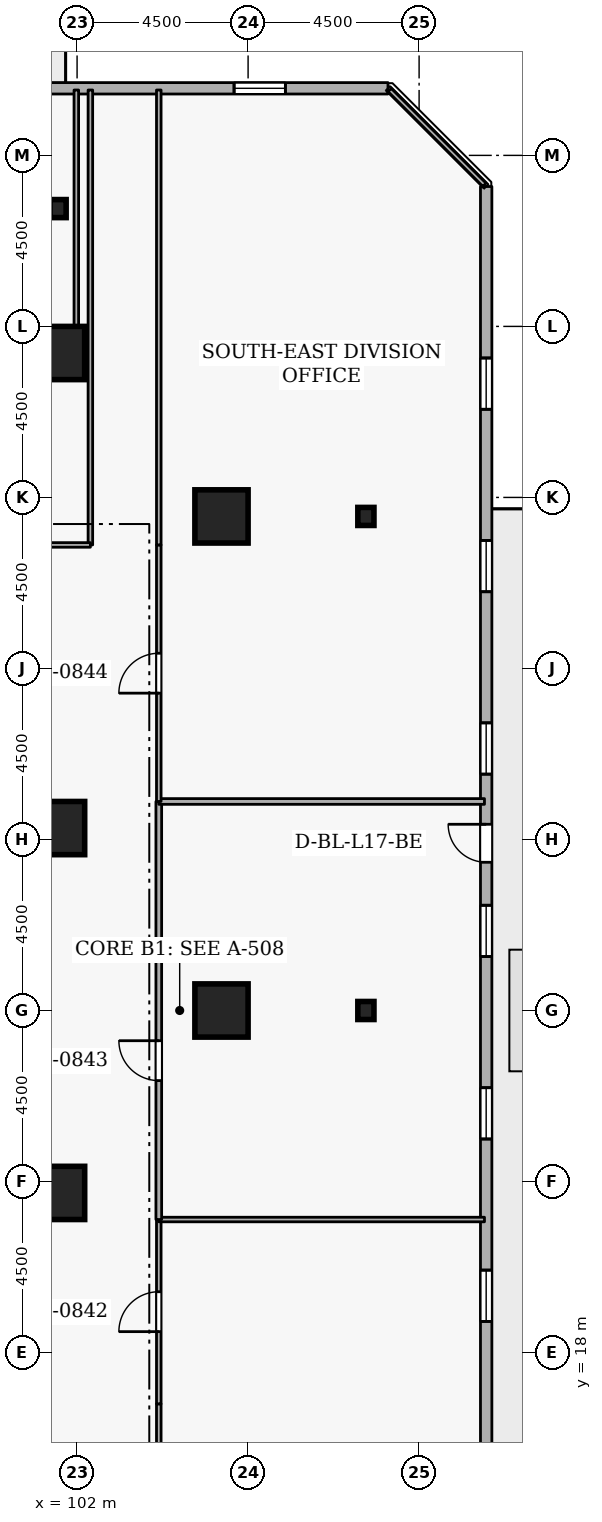
"""IFC4 building model, lengths in metres.
Left out: names, types, materials, properties, quantities, classifications, styles, units other than length and angle.
Written with IfcOpenShell. Run it as: python <this file> out.ifc"""

import sys

from ifc_helpers import new_model, si_unit, direction, frame, frame_2d, origin, origin_2d, place, context, subcontext, project, spatial, rectangle, i_section, extrude, element, fill, save


model = new_model("IFC4")
c1 = context("Model", 3, precision=1e-05, world=origin(), true_north=direction((0.0, 1.0)))
c2 = subcontext(c1, "Body", "Model", "MODEL_VIEW")
j1 = project(units=[si_unit("LENGTHUNIT", "METRE"), si_unit("PLANEANGLEUNIT", "RADIAN")], contexts=[c1])
p1 = place(None, origin())
s1 = spatial("IfcSite", under=j1, at=p1, CompositionType="ELEMENT")
p2 = place(p1, origin())
s2 = spatial("IfcBuilding", under=s1, at=p2, CompositionType="ELEMENT")
p3 = place(p2, frame((0.0, 0.0, 68.1)))
s3 = spatial("IfcBuildingStorey", under=s2, at=p3, CompositionType="ELEMENT", Elevation=68.1)
for number, where, z_axis, x_axis in (
    (1, (105.8, 27.0, 0.0), (0.0, 0.0, 1.0), (1.0, 0.0, 0.0)),
    (2, (105.8, 40.0, 0.0), (0.0, 0.0, 1.0), (1.0, 0.0, 0.0)),
    (3, (101.5, 44.3, 0.0), (0.0, 0.0, 1.0), (1.0, 0.0, 0.0)),
    (4, (101.5, 22.2, 0.0), (0.0, 0.0, 1.0), (1.0, 0.0, 0.0)),
    (5, (101.5, 31.8, 0.0), (0.0, 0.0, 1.0), (1.0, 0.0, 0.0)),
):
    element("IfcColumn", number, at=place(p3, frame(where, z_axis=z_axis, x_axis=x_axis)), inside=s3, PredefinedType="COLUMN", context=c2, shape_type="SweptSolid", body=[
        extrude(rectangle(XDim=1.4, YDim=1.4, at=origin_2d()), origin(), (0.0, 0.0, 1.0), 3.6),
    ])
for number, where, z_axis, x_axis in (
    (6, (109.6, 27.0, 0.0), (0.0, 0.0, 1.0), (1.0, 0.0, 0.0)),
    (7, (109.6, 40.0, 0.0), (0.0, 0.0, 1.0), (1.0, 0.0, 0.0)),
    (8, (101.5, 48.1, 0.0), (0.0, 0.0, 1.0), (1.0, 0.0, 0.0)),
):
    element("IfcColumn", number, at=place(p3, frame(where, z_axis=z_axis, x_axis=x_axis)), inside=s3, PredefinedType="COLUMN", context=c2, shape_type="SweptSolid", body=[
        extrude(i_section(OverallWidth=0.424, OverallDepth=0.475, WebThickness=0.048, FlangeThickness=0.077, FilletRadius=0.015, at=origin_2d()), origin(), (0.0, 0.0, 1.0), 3.6),
    ])
p4 = place(p3, frame((112.765, 11.319, 0.0), z_axis=(0.0, 0.0, 1.0), x_axis=(0.0, 1.0, 0.0)))
e9 = element("IfcWall", 9, at=p4, inside=s3, PredefinedType="STANDARD", context=c2, shape_type="SweptSolid", body=[
    extrude(rectangle(XDim=37.362, YDim=0.3, at=frame_2d((18.681, 0.0))), origin(), (0.0, 0.0, 1.0), 2.66),
])
p5 = place(p4, frame((19.581, 0.0, 0.0)))
e10 = element("IfcOpeningElement", 10, at=p5, cuts=e9, PredefinedType="OPENING", context=c2, shape_type="SweptSolid", body=[
    extrude(rectangle(XDim=1.0, YDim=2.08, at=frame_2d((0.5, 1.04))), frame((0.0, 0.16, 0.0), z_axis=(0.0, -1.0, 0.0), x_axis=(1.0, 0.0, 0.0)), (0.0, 0.0, 1.0), 0.32),
])
p6 = place(p4, frame((2.7, 0.0, 0.72)))
e11 = element("IfcOpeningElement", 11, at=p6, cuts=e9, PredefinedType="OPENING", context=c2, shape_type="SweptSolid", body=[
    extrude(rectangle(XDim=1.35, YDim=1.05, at=frame_2d((0.675, 0.525))), frame((0.0, 0.16, 0.0), z_axis=(0.0, -1.0, 0.0), x_axis=(1.0, 0.0, 0.0)), (0.0, 0.0, 1.0), 0.32),
])
p7 = place(p4, frame((7.5, 0.0, 0.72)))
e12 = element("IfcOpeningElement", 12, at=p7, cuts=e9, PredefinedType="OPENING", context=c2, shape_type="SweptSolid", body=[
    extrude(rectangle(XDim=1.35, YDim=1.05, at=frame_2d((0.675, 0.525))), frame((0.0, 0.16, 0.0), z_axis=(0.0, -1.0, 0.0), x_axis=(1.0, 0.0, 0.0)), (0.0, 0.0, 1.0), 0.32),
])
p8 = place(p4, frame((12.3, 0.0, 0.72)))
e13 = element("IfcOpeningElement", 13, at=p8, cuts=e9, PredefinedType="OPENING", context=c2, shape_type="SweptSolid", body=[
    extrude(rectangle(XDim=1.35, YDim=1.05, at=frame_2d((0.675, 0.525))), frame((0.0, 0.16, 0.0), z_axis=(0.0, -1.0, 0.0), x_axis=(1.0, 0.0, 0.0)), (0.0, 0.0, 1.0), 0.32),
])
p9 = place(p4, frame((17.1, 0.0, 0.72)))
e14 = element("IfcOpeningElement", 14, at=p9, cuts=e9, PredefinedType="OPENING", context=c2, shape_type="SweptSolid", body=[
    extrude(rectangle(XDim=1.35, YDim=1.05, at=frame_2d((0.675, 0.525))), frame((0.0, 0.16, 0.0), z_axis=(0.0, -1.0, 0.0), x_axis=(1.0, 0.0, 0.0)), (0.0, 0.0, 1.0), 0.32),
])
p10 = place(p4, frame((21.9, 0.0, 0.72)))
e15 = element("IfcOpeningElement", 15, at=p10, cuts=e9, PredefinedType="OPENING", context=c2, shape_type="SweptSolid", body=[
    extrude(rectangle(XDim=1.35, YDim=1.05, at=frame_2d((0.675, 0.525))), frame((0.0, 0.16, 0.0), z_axis=(0.0, -1.0, 0.0), x_axis=(1.0, 0.0, 0.0)), (0.0, 0.0, 1.0), 0.32),
])
p11 = place(p4, frame((26.7, 0.0, 0.72)))
e16 = element("IfcOpeningElement", 16, at=p11, cuts=e9, PredefinedType="OPENING", context=c2, shape_type="SweptSolid", body=[
    extrude(rectangle(XDim=1.35, YDim=1.05, at=frame_2d((0.675, 0.525))), frame((0.0, 0.16, 0.0), z_axis=(0.0, -1.0, 0.0), x_axis=(1.0, 0.0, 0.0)), (0.0, 0.0, 1.0), 0.32),
])
p12 = place(p4, frame((31.5, 0.0, 0.72)))
e17 = element("IfcOpeningElement", 17, at=p12, cuts=e9, PredefinedType="OPENING", context=c2, shape_type="SweptSolid", body=[
    extrude(rectangle(XDim=1.35, YDim=1.05, at=frame_2d((0.675, 0.525))), frame((0.0, 0.16, 0.0), z_axis=(0.0, -1.0, 0.0), x_axis=(1.0, 0.0, 0.0)), (0.0, 0.0, 1.0), 0.32),
])
p13 = place(p3, frame((110.181, 51.265, 0.0), z_axis=(0.0, 0.0, 1.0), x_axis=(-1.0, 0.0, 0.0)))
e18 = element("IfcWall", 18, at=p13, inside=s3, PredefinedType="STANDARD", context=c2, shape_type="SweptSolid", body=[
    extrude(rectangle(XDim=37.362, YDim=0.3, at=frame_2d((18.681, 0.0))), origin(), (0.0, 0.0, 1.0), 2.66),
])
p14 = place(p13, frame((19.581, 0.0, 0.0)))
e19 = element("IfcOpeningElement", 19, at=p14, cuts=e18, PredefinedType="OPENING", context=c2, shape_type="SweptSolid", body=[
    extrude(rectangle(XDim=1.0, YDim=2.08, at=frame_2d((0.5, 1.04))), frame((0.0, 0.16, 0.0), z_axis=(0.0, -1.0, 0.0), x_axis=(1.0, 0.0, 0.0)), (0.0, 0.0, 1.0), 0.32),
])
p15 = place(p13, frame((2.7, 0.0, 0.72)))
e20 = element("IfcOpeningElement", 20, at=p15, cuts=e18, PredefinedType="OPENING", context=c2, shape_type="SweptSolid", body=[
    extrude(rectangle(XDim=1.35, YDim=1.05, at=frame_2d((0.675, 0.525))), frame((0.0, 0.16, 0.0), z_axis=(0.0, -1.0, 0.0), x_axis=(1.0, 0.0, 0.0)), (0.0, 0.0, 1.0), 0.32),
])
p16 = place(p13, frame((12.3, 0.0, 0.72)))
e21 = element("IfcOpeningElement", 21, at=p16, cuts=e18, PredefinedType="OPENING", context=c2, shape_type="SweptSolid", body=[
    extrude(rectangle(XDim=1.35, YDim=1.05, at=frame_2d((0.675, 0.525))), frame((0.0, 0.16, 0.0), z_axis=(0.0, -1.0, 0.0), x_axis=(1.0, 0.0, 0.0)), (0.0, 0.0, 1.0), 0.32),
])
p17 = place(p13, frame((17.1, 0.0, 0.72)))
e22 = element("IfcOpeningElement", 22, at=p17, cuts=e18, PredefinedType="OPENING", context=c2, shape_type="SweptSolid", body=[
    extrude(rectangle(XDim=1.35, YDim=1.05, at=frame_2d((0.675, 0.525))), frame((0.0, 0.16, 0.0), z_axis=(0.0, -1.0, 0.0), x_axis=(1.0, 0.0, 0.0)), (0.0, 0.0, 1.0), 0.32),
])
p18 = place(p13, frame((26.7, 0.0, 0.72)))
e23 = element("IfcOpeningElement", 23, at=p18, cuts=e18, PredefinedType="OPENING", context=c2, shape_type="SweptSolid", body=[
    extrude(rectangle(XDim=1.35, YDim=1.05, at=frame_2d((0.675, 0.525))), frame((0.0, 0.16, 0.0), z_axis=(0.0, -1.0, 0.0), x_axis=(1.0, 0.0, 0.0)), (0.0, 0.0, 1.0), 0.32),
])
p19 = place(p13, frame((31.5, 0.0, 0.72)))
e24 = element("IfcOpeningElement", 24, at=p19, cuts=e18, PredefinedType="OPENING", context=c2, shape_type="SweptSolid", body=[
    extrude(rectangle(XDim=1.35, YDim=1.05, at=frame_2d((0.675, 0.525))), frame((0.0, 0.16, 0.0), z_axis=(0.0, -1.0, 0.0), x_axis=(1.0, 0.0, 0.0)), (0.0, 0.0, 1.0), 0.32),
])
p20 = place(p3, frame((101.98, 44.3, 0.0), z_axis=(0.0, 0.0, 1.0), x_axis=(0.0, 1.0, 0.0)))
e25 = element("IfcWall", 25, at=p20, inside=s3, PredefinedType="PARTITIONING", context=c2, shape_type="SweptSolid", body=[
    extrude(rectangle(XDim=6.92, YDim=0.12, at=frame_2d((3.46, 0.0))), origin(), (0.0, 0.0, 1.0), 3.26),
])
p21 = place(p3, frame((102.35, 51.22, 0.0), z_axis=(0.0, 0.0, 1.0), x_axis=(0.0, -1.0, 0.0)))
e26 = element("IfcWall", 26, at=p21, inside=s3, PredefinedType="PARTITIONING", context=c2, shape_type="SweptSolid", body=[
    extrude(rectangle(XDim=11.97, YDim=0.12, at=frame_2d((5.985, 0.0))), origin(), (0.0, 0.0, 1.0), 3.26),
])
p22 = place(p3, frame((102.35, 39.25, 0.0), z_axis=(0.0, 0.0, 1.0), x_axis=(-1.0, 0.0, 0.0)))
e27 = element("IfcWall", 27, at=p22, inside=s3, PredefinedType="PARTITIONING", context=c2, shape_type="SweptSolid", body=[
    extrude(rectangle(XDim=1.862, YDim=0.12, at=frame_2d((0.931, 0.0))), origin(), (0.0, 0.0, 1.0), 3.26),
])
p23 = place(p3, frame((104.15, 14.75, 0.0), z_axis=(0.0, 0.0, 1.0), x_axis=(0.0, 1.0, 0.0)))
e28 = element("IfcWall", 28, at=p23, inside=s3, PredefinedType="PARTITIONING", context=c2, shape_type="SweptSolid", body=[
    extrude(rectangle(XDim=1.9, YDim=0.12, at=frame_2d((0.95, 0.0))), origin(), (0.0, 0.0, 1.0), 3.26),
])
p24 = place(p3, frame((104.15, 16.65, 0.0), z_axis=(0.0, 0.0, 1.0), x_axis=(0.0, 1.0, 0.0)))
e29 = element("IfcWall", 29, at=p24, inside=s3, PredefinedType="PARTITIONING", context=c2, shape_type="SweptSolid", body=[
    extrude(rectangle(XDim=4.85, YDim=0.12, at=frame_2d((2.425, 0.0))), origin(), (0.0, 0.0, 1.0), 3.26),
])
p25 = place(p24, frame((1.9, 0.0, 0.0)))
e30 = element("IfcOpeningElement", 30, at=p25, cuts=e29, PredefinedType="OPENING", context=c2, shape_type="SweptSolid", body=[
    extrude(rectangle(XDim=1.05, YDim=2.1, at=frame_2d((0.525, 1.05))), frame((0.0, 0.07, 0.0), z_axis=(0.0, -1.0, 0.0), x_axis=(1.0, 0.0, 0.0)), (0.0, 0.0, 1.0), 0.14),
])
p26 = place(p3, frame((104.15, 21.5, 0.0), z_axis=(0.0, 0.0, 1.0), x_axis=(1.0, 0.0, 0.0)))
e31 = element("IfcWall", 31, at=p26, inside=s3, PredefinedType="PARTITIONING", context=c2, shape_type="SweptSolid", body=[
    extrude(rectangle(XDim=8.57, YDim=0.12, at=frame_2d((4.285, 0.0))), origin(), (0.0, 0.0, 1.0), 3.26),
])
p27 = place(p3, frame((104.15, 21.5, 0.0), z_axis=(0.0, 0.0, 1.0), x_axis=(0.0, 1.0, 0.0)))
e32 = element("IfcWall", 32, at=p27, inside=s3, PredefinedType="PARTITIONING", context=c2, shape_type="SweptSolid", body=[
    extrude(rectangle(XDim=11.0, YDim=0.15, at=frame_2d((5.5, 0.0))), origin(), (0.0, 0.0, 1.0), 3.26),
])
p28 = place(p27, frame((3.655, 0.0, 0.0)))
e33 = element("IfcOpeningElement", 33, at=p28, cuts=e32, PredefinedType="OPENING", context=c2, shape_type="SweptSolid", body=[
    extrude(rectangle(XDim=1.05, YDim=2.1, at=frame_2d((0.525, 1.05))), frame((0.0, 0.085, 0.0), z_axis=(0.0, -1.0, 0.0), x_axis=(1.0, 0.0, 0.0)), (0.0, 0.0, 1.0), 0.17),
])
p29 = place(p3, frame((104.15, 32.5, 0.0), z_axis=(0.0, 0.0, 1.0), x_axis=(1.0, 0.0, 0.0)))
e34 = element("IfcWall", 34, at=p29, inside=s3, PredefinedType="PARTITIONING", context=c2, shape_type="SweptSolid", body=[
    extrude(rectangle(XDim=8.57, YDim=0.15, at=frame_2d((4.285, 0.0))), origin(), (0.0, 0.0, 1.0), 3.26),
])
p30 = place(p3, frame((104.15, 32.5, 0.0), z_axis=(0.0, 0.0, 1.0), x_axis=(0.0, 1.0, 0.0)))
e35 = element("IfcWall", 35, at=p30, inside=s3, PredefinedType="PARTITIONING", context=c2, shape_type="SweptSolid", body=[
    extrude(rectangle(XDim=6.75, YDim=0.12, at=frame_2d((3.375, 0.0))), origin(), (0.0, 0.0, 1.0), 3.26),
])
p31 = place(p30, frame((2.85, 0.0, 0.0)))
e36 = element("IfcOpeningElement", 36, at=p31, cuts=e35, PredefinedType="OPENING", context=c2, shape_type="SweptSolid", body=[
    extrude(rectangle(XDim=1.05, YDim=2.1, at=frame_2d((0.525, 1.05))), frame((0.0, 0.07, 0.0), z_axis=(0.0, -1.0, 0.0), x_axis=(1.0, 0.0, 0.0)), (0.0, 0.0, 1.0), 0.14),
])
p32 = place(p3, frame((104.15, 39.25, 0.0), z_axis=(0.0, 0.0, 1.0), x_axis=(0.0, 1.0, 0.0)))
e37 = element("IfcWall", 37, at=p32, inside=s3, PredefinedType="PARTITIONING", context=c2, shape_type="SweptSolid", body=[
    extrude(rectangle(XDim=11.97, YDim=0.12, at=frame_2d((5.985, 0.0))), origin(), (0.0, 0.0, 1.0), 3.26),
])
p33 = place(p3, frame((110.225, 51.22, 0.0), z_axis=(0.0, 0.0, 1.0), x_axis=(0.707106781187, -0.707106781187, 0.0)))
e38 = element("IfcWall", 38, at=p33, inside=s3, PredefinedType="PARTITIONING", context=c2, shape_type="SweptSolid", body=[
    extrude(rectangle(XDim=3.528, YDim=0.12, at=frame_2d((1.764, 0.0))), origin(), (0.0, 0.0, 1.0), 3.26),
])
p34 = place(p5, origin())
e39 = element("IfcDoor", 39, at=p34, inside=s3, OperationType="SINGLE_SWING_RIGHT", PredefinedType="DOOR", context=c2, shape_type="SweptSolid", body=[
    extrude(rectangle(XDim=1.0, YDim=2.08, at=frame_2d((0.5, 1.04))), frame((0.0, 0.025, 0.0), z_axis=(0.0, -1.0, 0.0), x_axis=(1.0, 0.0, 0.0)), (0.0, 0.0, 1.0), 0.05),
])
fill(e10, e39)
p35 = place(p7, origin())
e40 = element("IfcWindow", 40, at=p35, inside=s3, PartitioningType="SINGLE_PANEL", PredefinedType="WINDOW", context=c2, shape_type="SweptSolid", body=[
    extrude(rectangle(XDim=1.35, YDim=1.05, at=frame_2d((0.675, 0.525))), frame((0.0, 0.03, 0.0), z_axis=(0.0, -1.0, 0.0), x_axis=(1.0, 0.0, 0.0)), (0.0, 0.0, 1.0), 0.06),
])
fill(e12, e40)
p36 = place(p8, origin())
e41 = element("IfcWindow", 41, at=p36, inside=s3, PartitioningType="SINGLE_PANEL", PredefinedType="WINDOW", context=c2, shape_type="SweptSolid", body=[
    extrude(rectangle(XDim=1.35, YDim=1.05, at=frame_2d((0.675, 0.525))), frame((0.0, 0.03, 0.0), z_axis=(0.0, -1.0, 0.0), x_axis=(1.0, 0.0, 0.0)), (0.0, 0.0, 1.0), 0.06),
])
fill(e13, e41)
p37 = place(p9, origin())
e42 = element("IfcWindow", 42, at=p37, inside=s3, PartitioningType="SINGLE_PANEL", PredefinedType="WINDOW", context=c2, shape_type="SweptSolid", body=[
    extrude(rectangle(XDim=1.35, YDim=1.05, at=frame_2d((0.675, 0.525))), frame((0.0, 0.03, 0.0), z_axis=(0.0, -1.0, 0.0), x_axis=(1.0, 0.0, 0.0)), (0.0, 0.0, 1.0), 0.06),
])
fill(e14, e42)
p38 = place(p10, origin())
e43 = element("IfcWindow", 43, at=p38, inside=s3, PartitioningType="SINGLE_PANEL", PredefinedType="WINDOW", context=c2, shape_type="SweptSolid", body=[
    extrude(rectangle(XDim=1.35, YDim=1.05, at=frame_2d((0.675, 0.525))), frame((0.0, 0.03, 0.0), z_axis=(0.0, -1.0, 0.0), x_axis=(1.0, 0.0, 0.0)), (0.0, 0.0, 1.0), 0.06),
])
fill(e15, e43)
p39 = place(p11, origin())
e44 = element("IfcWindow", 44, at=p39, inside=s3, PartitioningType="SINGLE_PANEL", PredefinedType="WINDOW", context=c2, shape_type="SweptSolid", body=[
    extrude(rectangle(XDim=1.35, YDim=1.05, at=frame_2d((0.675, 0.525))), frame((0.0, 0.03, 0.0), z_axis=(0.0, -1.0, 0.0), x_axis=(1.0, 0.0, 0.0)), (0.0, 0.0, 1.0), 0.06),
])
fill(e16, e44)
p40 = place(p12, origin())
e45 = element("IfcWindow", 45, at=p40, inside=s3, PartitioningType="SINGLE_PANEL", PredefinedType="WINDOW", context=c2, shape_type="SweptSolid", body=[
    extrude(rectangle(XDim=1.35, YDim=1.05, at=frame_2d((0.675, 0.525))), frame((0.0, 0.03, 0.0), z_axis=(0.0, -1.0, 0.0), x_axis=(1.0, 0.0, 0.0)), (0.0, 0.0, 1.0), 0.06),
])
fill(e17, e45)
p41 = place(p15, origin())
e46 = element("IfcWindow", 46, at=p41, inside=s3, PartitioningType="SINGLE_PANEL", PredefinedType="WINDOW", context=c2, shape_type="SweptSolid", body=[
    extrude(rectangle(XDim=1.35, YDim=1.05, at=frame_2d((0.675, 0.525))), frame((0.0, 0.03, 0.0), z_axis=(0.0, -1.0, 0.0), x_axis=(1.0, 0.0, 0.0)), (0.0, 0.0, 1.0), 0.06),
])
fill(e20, e46)
p42 = place(p25, origin())
e47 = element("IfcDoor", 47, at=p42, inside=s3, OperationType="SINGLE_SWING_LEFT", PredefinedType="DOOR", context=c2, shape_type="SweptSolid", body=[
    extrude(rectangle(XDim=1.05, YDim=2.1, at=frame_2d((0.525, 1.05))), frame((0.0, 0.025, 0.0), z_axis=(0.0, -1.0, 0.0), x_axis=(1.0, 0.0, 0.0)), (0.0, 0.0, 1.0), 0.05),
])
fill(e30, e47)
p43 = place(p28, origin())
e48 = element("IfcDoor", 48, at=p43, inside=s3, OperationType="SINGLE_SWING_RIGHT", PredefinedType="DOOR", context=c2, shape_type="SweptSolid", body=[
    extrude(rectangle(XDim=1.05, YDim=2.1, at=frame_2d((0.525, 1.05))), frame((0.0, 0.025, 0.0), z_axis=(0.0, -1.0, 0.0), x_axis=(1.0, 0.0, 0.0)), (0.0, 0.0, 1.0), 0.05),
])
fill(e33, e48)
p44 = place(p31, origin())
e49 = element("IfcDoor", 49, at=p44, inside=s3, OperationType="SINGLE_SWING_LEFT", PredefinedType="DOOR", context=c2, shape_type="SweptSolid", body=[
    extrude(rectangle(XDim=1.05, YDim=2.1, at=frame_2d((0.525, 1.05))), frame((0.0, 0.025, 0.0), z_axis=(0.0, -1.0, 0.0), x_axis=(1.0, 0.0, 0.0)), (0.0, 0.0, 1.0), 0.05),
])
fill(e36, e49)
save(model, sys.argv[1])
